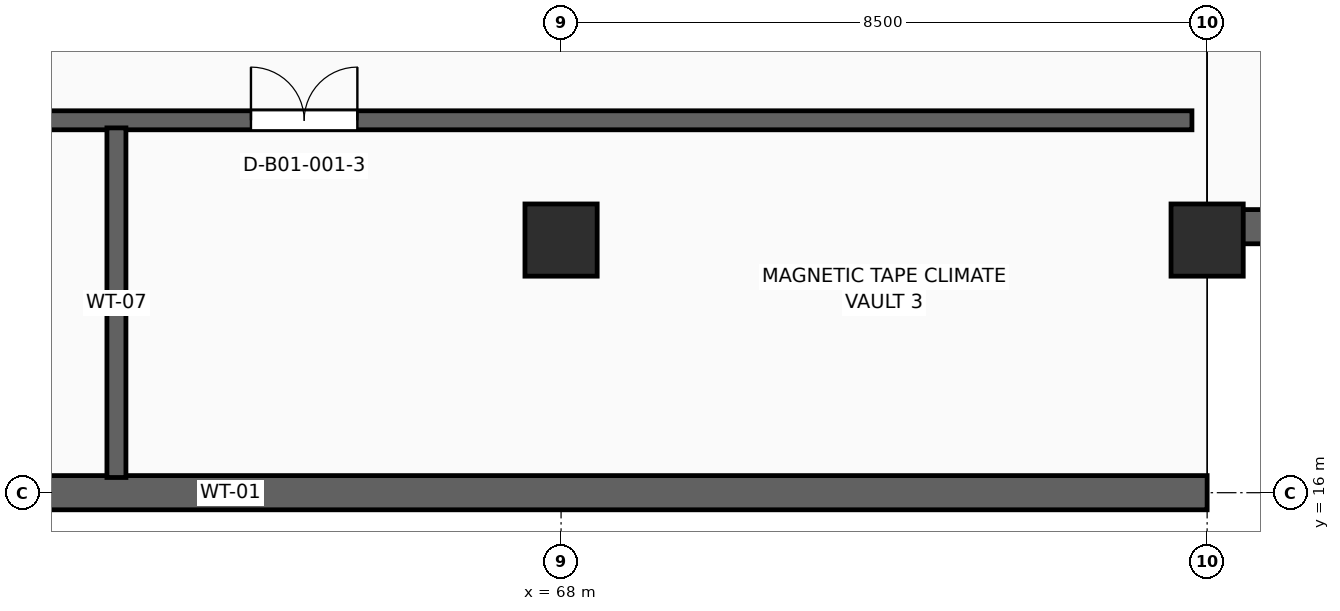
"""IFC4 building model, lengths in metres.
Left out: names, types, materials, properties, quantities, classifications, styles, units other than length and angle.
Written with IfcOpenShell. Run it as: python <this file> out.ifc"""

import sys

from ifc_helpers import new_model, si_unit, direction, frame, frame_2d, origin, origin_2d, place, context, subcontext, project, spatial, rectangle, extrude, element, fill, save


model = new_model("IFC4")
c1 = context("Model", 3, precision=1e-05, world=origin(), true_north=direction((0.0, 1.0)))
c2 = subcontext(c1, "Body", "Model", "MODEL_VIEW")
j1 = project(units=[si_unit("LENGTHUNIT", "METRE"), si_unit("PLANEANGLEUNIT", "RADIAN")], contexts=[c1])
p1 = place(None, origin())
s1 = spatial("IfcSite", under=j1, at=p1, CompositionType="ELEMENT")
p2 = place(p1, origin())
s2 = spatial("IfcBuilding", under=s1, at=p2, CompositionType="ELEMENT")
p3 = place(p2, frame((0.0, 0.0, -4.8)))
s3 = spatial("IfcBuildingStorey", under=s2, at=p3, CompositionType="ELEMENT", Elevation=-4.8)
p4 = place(p3, frame((21.5, 16.0, 0.0), z_axis=(0.0, 0.0, 1.0), x_axis=(1.0, 0.0, 0.0)))
e1 = element("IfcWall", 1, at=p4, inside=s3, PredefinedType="SHEAR", context=c2, shape_type="SweptSolid", body=[
    extrude(rectangle(XDim=55.0, YDim=0.45, at=frame_2d((27.5, 0.0))), origin(), (0.0, 0.0, 1.0), 4.42),
])
p5 = place(p3, frame((76.5, 19.5, 0.0), z_axis=(0.0, 0.0, 1.0), x_axis=(1.0, 0.0, 0.0)))
e2 = element("IfcWall", 2, at=p5, inside=s3, PredefinedType="SHEAR", context=c2, shape_type="SweptSolid", body=[
    extrude(rectangle(XDim=51.0, YDim=0.45, at=frame_2d((25.5, 0.0))), origin(), (0.0, 0.0, 1.0), 4.42),
])
for number, where, z_axis, x_axis in (
    (3, (68.0, 19.324, 0.0), (0.0, 0.0, 1.0), (1.0, 0.0, 0.0)),
    (4, (76.5, 19.324, 0.0), (0.0, 0.0, 1.0), (1.0, 0.0, 0.0)),
):
    element("IfcColumn", number, at=place(p3, frame(where, z_axis=z_axis, x_axis=x_axis)), inside=s3, PredefinedType="COLUMN", context=c2, shape_type="SweptSolid", body=[
        extrude(rectangle(XDim=0.95, YDim=0.95, at=origin_2d()), origin(), (0.0, 0.0, 1.0), 4.46),
    ])
p6 = place(p3, frame((21.72, 20.9, 0.0), z_axis=(0.0, 0.0, 1.0), x_axis=(1.0, 0.0, 0.0)))
e5 = element("IfcWall", 5, at=p6, inside=s3, PredefinedType="STANDARD", context=c2, shape_type="SweptSolid", body=[
    extrude(rectangle(XDim=54.58, YDim=0.25, at=frame_2d((27.29, 0.0))), origin(), (0.0, 0.0, 1.0), 4.5),
])
p7 = place(p6, frame((6.0, 0.0, 0.0)))
e6 = element("IfcOpeningElement", 6, at=p7, cuts=e5, PredefinedType="OPENING", context=c2, shape_type="SweptSolid", body=[
    extrude(rectangle(XDim=1.4, YDim=2.3, at=frame_2d((0.7, 1.15))), frame((0.0, 0.137, 0.0), z_axis=(0.0, -1.0, 0.0), x_axis=(1.0, 0.0, 0.0)), (0.0, 0.0, 1.0), 0.274),
])
p8 = place(p6, frame((26.0, 0.0, 0.0)))
e7 = element("IfcOpeningElement", 7, at=p8, cuts=e5, PredefinedType="OPENING", context=c2, shape_type="SweptSolid", body=[
    extrude(rectangle(XDim=1.4, YDim=2.3, at=frame_2d((0.7, 1.15))), frame((0.0, 0.137, 0.0), z_axis=(0.0, -1.0, 0.0), x_axis=(1.0, 0.0, 0.0)), (0.0, 0.0, 1.0), 0.274),
])
p9 = place(p6, frame((42.2, 0.0, 0.0)))
e8 = element("IfcOpeningElement", 8, at=p9, cuts=e5, PredefinedType="OPENING", context=c2, shape_type="SweptSolid", body=[
    extrude(rectangle(XDim=1.4, YDim=2.3, at=frame_2d((0.7, 1.15))), frame((0.0, 0.137, 0.0), z_axis=(0.0, -1.0, 0.0), x_axis=(1.0, 0.0, 0.0)), (0.0, 0.0, 1.0), 0.274),
])
p10 = place(p3, frame((62.15, 16.2, 0.0), z_axis=(0.0, 0.0, 1.0), x_axis=(0.0, 1.0, 0.0)))
e9 = element("IfcWall", 9, at=p10, inside=s3, PredefinedType="STANDARD", context=c2, shape_type="SweptSolid", body=[
    extrude(rectangle(XDim=4.6, YDim=0.25, at=frame_2d((2.3, 0.0))), origin(), (0.0, 0.0, 1.0), 4.5),
])
p11 = place(p9, origin())
e10 = element("IfcDoor", 10, at=p11, inside=s3, OperationType="DOUBLE_DOOR_SINGLE_SWING", PredefinedType="DOOR", context=c2, shape_type="SweptSolid", body=[
    extrude(rectangle(XDim=1.4, YDim=2.3, at=frame_2d((0.7, 1.15))), frame((0.0, 0.025, 0.0), z_axis=(0.0, -1.0, 0.0), x_axis=(1.0, 0.0, 0.0)), (0.0, 0.0, 1.0), 0.05),
])
fill(e8, e10)
save(model, sys.argv[1])
